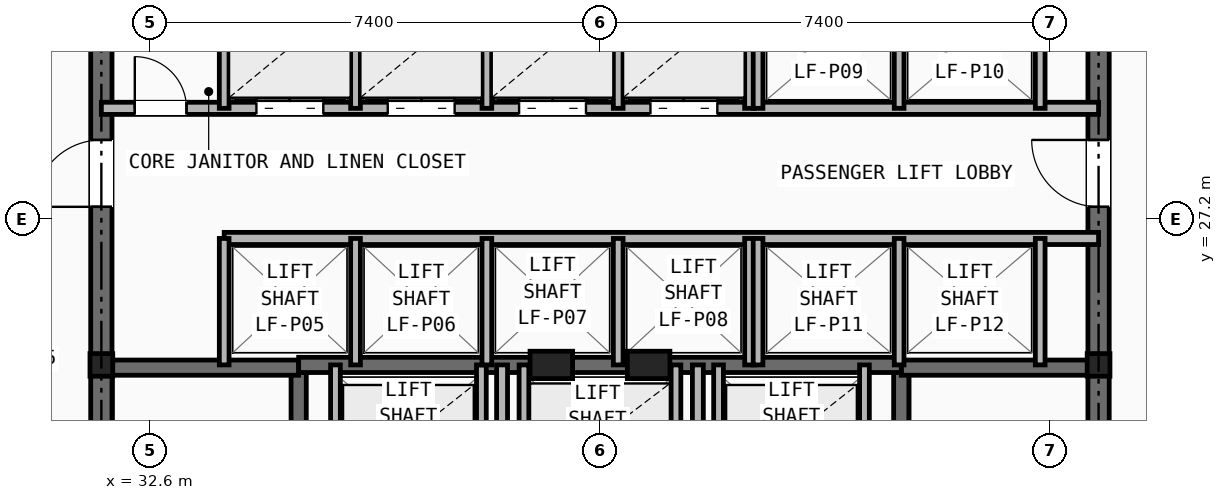
"""IFC4 building model, lengths in metres.
Left out: names, types, materials, properties, quantities, classifications, styles, units other than length and angle.
Written with IfcOpenShell. Run it as: python <this file> out.ifc"""

import sys

from ifc_helpers import new_model, si_unit, direction, frame, frame_2d, origin, origin_2d, place, context, subcontext, project, spatial, rectangle, i_section, extrude, element, fill, save


model = new_model("IFC4")
c1 = context("Model", 3, precision=1e-05, world=origin(), true_north=direction((0.0, 1.0)))
c2 = subcontext(c1, "Body", "Model", "MODEL_VIEW")
j1 = project(units=[si_unit("LENGTHUNIT", "METRE"), si_unit("PLANEANGLEUNIT", "RADIAN")], contexts=[c1])
p1 = place(None, origin())
s1 = spatial("IfcSite", under=j1, at=p1, CompositionType="ELEMENT")
p2 = place(p1, origin())
s2 = spatial("IfcBuilding", under=s1, at=p2, CompositionType="ELEMENT")
p3 = place(p2, frame((0.0, 0.0, 102.2)))
s3 = spatial("IfcBuildingStorey", under=s2, at=p3, CompositionType="ELEMENT", Elevation=102.2)
for number, where, z_axis, x_axis in (
    (1, (31.8, 24.8, 0.0), (0.0, 0.0, 1.0), (1.0, 0.0, 0.0)),
    (2, (48.2, 24.8, 0.0), (0.0, 0.0, 1.0), (1.0, 0.0, 0.0)),
):
    element("IfcColumn", number, at=place(p3, frame(where, z_axis=z_axis, x_axis=x_axis)), inside=s3, PredefinedType="COLUMN", context=c2, shape_type="SweptSolid", body=[
        extrude(i_section(OverallWidth=0.374, OverallDepth=0.372, WebThickness=0.016, FlangeThickness=0.026, at=origin_2d()), origin(), (0.0, 0.0, 1.0), 3.2),
    ])
for number, where, z_axis, x_axis in (
    (3, (39.2, 24.8, 0.0), (0.0, 0.0, 1.0), (1.0, 0.0, 0.0)),
    (4, (40.8, 24.8, 0.0), (0.0, 0.0, 1.0), (1.0, 0.0, 0.0)),
):
    element("IfcColumn", number, at=place(p3, frame(where, z_axis=z_axis, x_axis=x_axis)), inside=s3, PredefinedType="PILASTER", context=c2, shape_type="SweptSolid", body=[
        extrude(rectangle(XDim=0.7, YDim=0.45, at=origin_2d()), origin(), (0.0, 0.0, 1.0), 3.2),
    ])
p4 = place(p3, frame((31.8, 16.4, 0.0), z_axis=(0.0, 0.0, 1.0), x_axis=(0.0, 1.0, 0.0)))
e5 = element("IfcWall", 5, at=p4, inside=s3, PredefinedType="SHEAR", context=c2, shape_type="SweptSolid", body=[
    extrude(rectangle(XDim=14.8, YDim=0.35, at=frame_2d((7.4, 0.0))), origin(), (0.0, 0.0, 1.0), 2.97),
])
p5 = place(p4, frame((11.0, 0.0, 0.0)))
e6 = element("IfcOpeningElement", 6, at=p5, cuts=e5, PredefinedType="OPENING", context=c2, shape_type="SweptSolid", body=[
    extrude(rectangle(XDim=1.1, YDim=2.15, at=frame_2d((0.55, 1.075))), frame((0.0, 0.185, 0.0), z_axis=(0.0, -1.0, 0.0), x_axis=(1.0, 0.0, 0.0)), (0.0, 0.0, 1.0), 0.37),
])
p6 = place(p3, frame((48.2, 16.4, 0.0), z_axis=(0.0, 0.0, 1.0), x_axis=(0.0, 1.0, 0.0)))
e7 = element("IfcWall", 7, at=p6, inside=s3, PredefinedType="SHEAR", context=c2, shape_type="SweptSolid", body=[
    extrude(rectangle(XDim=14.8, YDim=0.35, at=frame_2d((7.4, 0.0))), origin(), (0.0, 0.0, 1.0), 2.97),
])
p7 = place(p6, frame((11.0, 0.0, 0.0)))
e8 = element("IfcOpeningElement", 8, at=p7, cuts=e7, PredefinedType="OPENING", context=c2, shape_type="SweptSolid", body=[
    extrude(rectangle(XDim=1.1, YDim=2.15, at=frame_2d((0.55, 1.075))), frame((0.0, 0.185, 0.0), z_axis=(0.0, -1.0, 0.0), x_axis=(1.0, 0.0, 0.0)), (0.0, 0.0, 1.0), 0.37),
])
p8 = place(p3, frame((35.045, 16.4, 0.0), z_axis=(0.0, 0.0, 1.0), x_axis=(0.0, 1.0, 0.0)))
e9 = element("IfcWall", 9, at=p8, inside=s3, PredefinedType="SHEAR", context=c2, shape_type="SweptSolid", body=[
    extrude(rectangle(XDim=8.4, YDim=0.25, at=frame_2d((4.2, 0.0))), origin(), (0.0, 0.0, 1.0), 2.97),
])
p9 = place(p8, frame((0.45, 0.0, 0.0)))
e10 = element("IfcOpeningElement", 10, at=p9, cuts=e9, PredefinedType="OPENING", context=c2, shape_type="SweptSolid", body=[
    extrude(rectangle(XDim=0.95, YDim=2.1, at=frame_2d((0.475, 1.05))), frame((0.0, 0.135, 0.0), z_axis=(0.0, -1.0, 0.0), x_axis=(1.0, 0.0, 0.0)), (0.0, 0.0, 1.0), 0.27),
])
p10 = place(p3, frame((31.8, 24.755, 0.0), z_axis=(0.0, 0.0, 1.0), x_axis=(1.0, 0.0, 0.0)))
e11 = element("IfcWall", 11, at=p10, inside=s3, PredefinedType="SHEAR", context=c2, shape_type="SweptSolid", body=[
    extrude(rectangle(XDim=3.245, YDim=0.25, at=frame_2d((1.623, 0.0))), origin(), (0.0, 0.0, 1.0), 2.97),
])
p11 = place(p3, frame((44.955, 16.4, 0.0), z_axis=(0.0, 0.0, 1.0), x_axis=(0.0, 1.0, 0.0)))
e12 = element("IfcWall", 12, at=p11, inside=s3, PredefinedType="SHEAR", context=c2, shape_type="SweptSolid", body=[
    extrude(rectangle(XDim=8.4, YDim=0.25, at=frame_2d((4.2, 0.0))), origin(), (0.0, 0.0, 1.0), 2.97),
])
p12 = place(p11, frame((0.45, 0.0, 0.0)))
e13 = element("IfcOpeningElement", 13, at=p12, cuts=e12, PredefinedType="OPENING", context=c2, shape_type="SweptSolid", body=[
    extrude(rectangle(XDim=0.95, YDim=2.1, at=frame_2d((0.475, 1.05))), frame((0.0, 0.135, 0.0), z_axis=(0.0, -1.0, 0.0), x_axis=(1.0, 0.0, 0.0)), (0.0, 0.0, 1.0), 0.27),
])
p13 = place(p3, frame((44.955, 24.755, 0.0), z_axis=(0.0, 0.0, 1.0), x_axis=(1.0, 0.0, 0.0)))
e14 = element("IfcWall", 14, at=p13, inside=s3, PredefinedType="SHEAR", context=c2, shape_type="SweptSolid", body=[
    extrude(rectangle(XDim=3.245, YDim=0.25, at=frame_2d((1.623, 0.0))), origin(), (0.0, 0.0, 1.0), 2.97),
])
p14 = place(p3, frame((35.045, 24.8, 0.0), z_axis=(0.0, 0.0, 1.0), x_axis=(1.0, 0.0, 0.0)))
e15 = element("IfcWall", 15, at=p14, inside=s3, PredefinedType="SHEAR", context=c2, shape_type="SweptSolid", body=[
    extrude(rectangle(XDim=9.91, YDim=0.25, at=frame_2d((4.955, 0.0))), origin(), (0.0, 0.0, 1.0), 2.97),
])
p15 = place(p3, frame((38.39, 16.4, 0.0), z_axis=(0.0, 0.0, 1.0), x_axis=(0.0, 1.0, 0.0)))
e16 = element("IfcWall", 16, at=p15, inside=s3, PredefinedType="PARTITIONING", context=c2, shape_type="SweptSolid", body=[
    extrude(rectangle(XDim=8.4, YDim=0.18, at=frame_2d((4.2, 0.0))), origin(), (0.0, 0.0, 1.0), 2.421),
])
p16 = place(p15, frame((3.8, 0.0, 0.0)))
e17 = element("IfcOpeningElement", 17, at=p16, cuts=e16, PredefinedType="OPENING", context=c2, shape_type="SweptSolid", body=[
    extrude(rectangle(XDim=0.95, YDim=2.1, at=frame_2d((0.475, 1.05))), frame((0.0, 0.1, 0.0), z_axis=(0.0, -1.0, 0.0), x_axis=(1.0, 0.0, 0.0)), (0.0, 0.0, 1.0), 0.2),
])
p17 = place(p3, frame((41.61, 16.4, 0.0), z_axis=(0.0, 0.0, 1.0), x_axis=(0.0, 1.0, 0.0)))
e18 = element("IfcWall", 18, at=p17, inside=s3, PredefinedType="PARTITIONING", context=c2, shape_type="SweptSolid", body=[
    extrude(rectangle(XDim=8.4, YDim=0.18, at=frame_2d((4.2, 0.0))), origin(), (0.0, 0.0, 1.0), 2.421),
])
for number, where, z_axis, x_axis in (
    (19, (35.65, 22.48, 0.0), (0.0, 0.0, 1.0), (0.0, 1.0, 0.0)),
    (20, (38.05, 22.48, 0.0), (0.0, 0.0, 1.0), (0.0, 1.0, 0.0)),
    (21, (41.95, 22.48, 0.0), (0.0, 0.0, 1.0), (0.0, 1.0, 0.0)),
    (22, (44.35, 22.48, 0.0), (0.0, 0.0, 1.0), (0.0, 1.0, 0.0)),
    (23, (38.75, 22.48, 0.0), (0.0, 0.0, 1.0), (0.0, 1.0, 0.0)),
    (24, (41.25, 22.48, 0.0), (0.0, 0.0, 1.0), (0.0, 1.0, 0.0)),
):
    element("IfcWall", number, at=place(p3, frame(where, z_axis=z_axis, x_axis=x_axis)), inside=s3, PredefinedType="SOLIDWALL", context=c2, shape_type="SweptSolid", body=[
        extrude(rectangle(XDim=2.32, YDim=0.16, at=frame_2d((1.16, 0.0))), origin(), (0.0, 0.0, 1.0), 2.97),
    ])
p18 = place(p3, frame((31.8, 29.02, 0.0), z_axis=(0.0, 0.0, 1.0), x_axis=(1.0, 0.0, 0.0)))
e25 = element("IfcWall", 25, at=p18, inside=s3, PredefinedType="SOLIDWALL", context=c2, shape_type="SweptSolid", body=[
    extrude(rectangle(XDim=16.4, YDim=0.2, at=frame_2d((8.2, 0.0))), origin(), (0.0, 0.0, 1.0), 2.421),
])
p19 = place(p18, frame((0.55, 0.0, 0.0)))
e26 = element("IfcOpeningElement", 26, at=p19, cuts=e25, PredefinedType="OPENING", context=c2, shape_type="SweptSolid", body=[
    extrude(rectangle(XDim=0.85, YDim=2.05, at=frame_2d((0.425, 1.025))), frame((0.0, 0.11, 0.0), z_axis=(0.0, -1.0, 0.0), x_axis=(1.0, 0.0, 0.0)), (0.0, 0.0, 1.0), 0.22),
])
p20 = place(p18, frame((2.55, 0.0, 0.0)))
e27 = element("IfcOpeningElement", 27, at=p20, cuts=e25, PredefinedType="OPENING", context=c2, shape_type="SweptSolid", body=[
    extrude(rectangle(XDim=1.1, YDim=2.15, at=frame_2d((0.55, 1.075))), frame((0.0, 0.11, 0.0), z_axis=(0.0, -1.0, 0.0), x_axis=(1.0, 0.0, 0.0)), (0.0, 0.0, 1.0), 0.22),
])
p21 = place(p18, frame((4.71, 0.0, 0.0)))
e28 = element("IfcOpeningElement", 28, at=p21, cuts=e25, PredefinedType="OPENING", context=c2, shape_type="SweptSolid", body=[
    extrude(rectangle(XDim=1.1, YDim=2.15, at=frame_2d((0.55, 1.075))), frame((0.0, 0.11, 0.0), z_axis=(0.0, -1.0, 0.0), x_axis=(1.0, 0.0, 0.0)), (0.0, 0.0, 1.0), 0.22),
])
p22 = place(p18, frame((6.87, 0.0, 0.0)))
e29 = element("IfcOpeningElement", 29, at=p22, cuts=e25, PredefinedType="OPENING", context=c2, shape_type="SweptSolid", body=[
    extrude(rectangle(XDim=1.1, YDim=2.15, at=frame_2d((0.55, 1.075))), frame((0.0, 0.11, 0.0), z_axis=(0.0, -1.0, 0.0), x_axis=(1.0, 0.0, 0.0)), (0.0, 0.0, 1.0), 0.22),
])
p23 = place(p18, frame((9.03, 0.0, 0.0)))
e30 = element("IfcOpeningElement", 30, at=p23, cuts=e25, PredefinedType="OPENING", context=c2, shape_type="SweptSolid", body=[
    extrude(rectangle(XDim=1.1, YDim=2.15, at=frame_2d((0.55, 1.075))), frame((0.0, 0.11, 0.0), z_axis=(0.0, -1.0, 0.0), x_axis=(1.0, 0.0, 0.0)), (0.0, 0.0, 1.0), 0.22),
])
p24 = place(p3, frame((33.82, 26.88, 0.0), z_axis=(0.0, 0.0, 1.0), x_axis=(1.0, 0.0, 0.0)))
e31 = element("IfcWall", 31, at=p24, inside=s3, PredefinedType="SOLIDWALL", context=c2, shape_type="SweptSolid", body=[
    extrude(rectangle(XDim=14.38, YDim=0.2, at=frame_2d((7.19, 0.0))), origin(), (0.0, 0.0, 1.0), 2.421),
])
p25 = place(p3, frame((33.82, 29.02, 0.0), z_axis=(0.0, 0.0, 1.0), x_axis=(0.0, 1.0, 0.0)))
e32 = element("IfcWall", 32, at=p25, inside=s3, PredefinedType="SOLIDWALL", context=c2, shape_type="SweptSolid", body=[
    extrude(rectangle(XDim=2.18, YDim=0.16, at=frame_2d((1.09, 0.0))), origin(), (0.0, 0.0, 1.0), 2.421),
])
p26 = place(p3, frame((33.82, 24.8, 0.0), z_axis=(0.0, 0.0, 1.0), x_axis=(0.0, 1.0, 0.0)))
e33 = element("IfcWall", 33, at=p26, inside=s3, PredefinedType="SOLIDWALL", context=c2, shape_type="SweptSolid", body=[
    extrude(rectangle(XDim=2.08, YDim=0.16, at=frame_2d((1.04, 0.0))), origin(), (0.0, 0.0, 1.0), 2.97),
])
for number, where, z_axis, x_axis in (
    (34, (35.98, 29.02, 0.0), (0.0, 0.0, 1.0), (0.0, 1.0, 0.0)),
    (35, (38.14, 29.02, 0.0), (0.0, 0.0, 1.0), (0.0, 1.0, 0.0)),
    (36, (40.3, 29.02, 0.0), (0.0, 0.0, 1.0), (0.0, 1.0, 0.0)),
    (37, (42.46, 29.02, 0.0), (0.0, 0.0, 1.0), (0.0, 1.0, 0.0)),
):
    element("IfcWall", number, at=place(p3, frame(where, z_axis=z_axis, x_axis=x_axis)), inside=s3, PredefinedType="SOLIDWALL", context=c2, shape_type="SweptSolid", body=[
        extrude(rectangle(XDim=2.18, YDim=0.16, at=frame_2d((1.09, 0.0))), origin(), (0.0, 0.0, 1.0), 2.421),
    ])
for number, where, z_axis, x_axis in (
    (38, (35.98, 24.8, 0.0), (0.0, 0.0, 1.0), (0.0, 1.0, 0.0)),
    (39, (38.14, 24.8, 0.0), (0.0, 0.0, 1.0), (0.0, 1.0, 0.0)),
    (40, (40.3, 24.8, 0.0), (0.0, 0.0, 1.0), (0.0, 1.0, 0.0)),
    (41, (42.46, 24.8, 0.0), (0.0, 0.0, 1.0), (0.0, 1.0, 0.0)),
):
    element("IfcWall", number, at=place(p3, frame(where, z_axis=z_axis, x_axis=x_axis)), inside=s3, PredefinedType="SOLIDWALL", context=c2, shape_type="SweptSolid", body=[
        extrude(rectangle(XDim=2.08, YDim=0.16, at=frame_2d((1.04, 0.0))), origin(), (0.0, 0.0, 1.0), 2.97),
    ])
for number, where, z_axis, x_axis in (
    (42, (42.6, 29.02, 0.0), (0.0, 0.0, 1.0), (0.0, 1.0, 0.0)),
    (43, (44.92, 29.02, 0.0), (0.0, 0.0, 1.0), (0.0, 1.0, 0.0)),
    (44, (47.24, 29.02, 0.0), (0.0, 0.0, 1.0), (0.0, 1.0, 0.0)),
):
    element("IfcWall", number, at=place(p3, frame(where, z_axis=z_axis, x_axis=x_axis)), inside=s3, PredefinedType="SOLIDWALL", context=c2, shape_type="SweptSolid", body=[
        extrude(rectangle(XDim=2.18, YDim=0.16, at=frame_2d((1.09, 0.0))), origin(), (0.0, 0.0, 1.0), 2.421),
    ])
for number, where, z_axis, x_axis in (
    (45, (42.6, 24.8, 0.0), (0.0, 0.0, 1.0), (0.0, 1.0, 0.0)),
    (46, (44.92, 24.8, 0.0), (0.0, 0.0, 1.0), (0.0, 1.0, 0.0)),
    (47, (47.24, 24.8, 0.0), (0.0, 0.0, 1.0), (0.0, 1.0, 0.0)),
):
    element("IfcWall", number, at=place(p3, frame(where, z_axis=z_axis, x_axis=x_axis)), inside=s3, PredefinedType="SOLIDWALL", context=c2, shape_type="SweptSolid", body=[
        extrude(rectangle(XDim=2.08, YDim=0.16, at=frame_2d((1.04, 0.0))), origin(), (0.0, 0.0, 1.0), 2.97),
    ])
p27 = place(p19, origin())
e48 = element("IfcDoor", 48, at=p27, inside=s3, OperationType="SINGLE_SWING_LEFT", PredefinedType="DOOR", context=c2, shape_type="SweptSolid", body=[
    extrude(rectangle(XDim=0.85, YDim=2.05, at=frame_2d((0.425, 1.025))), frame((0.0, 0.025, 0.0), z_axis=(0.0, -1.0, 0.0), x_axis=(1.0, 0.0, 0.0)), (0.0, 0.0, 1.0), 0.05),
])
fill(e26, e48)
p28 = place(p5, origin())
e49 = element("IfcDoor", 49, at=p28, inside=s3, OperationType="SINGLE_SWING_LEFT", PredefinedType="DOOR", context=c2, shape_type="SweptSolid", body=[
    extrude(rectangle(XDim=1.1, YDim=2.15, at=frame_2d((0.55, 1.075))), frame((0.0, 0.025, 0.0), z_axis=(0.0, -1.0, 0.0), x_axis=(1.0, 0.0, 0.0)), (0.0, 0.0, 1.0), 0.05),
])
fill(e6, e49)
p29 = place(p7, origin())
e50 = element("IfcDoor", 50, at=p29, inside=s3, OperationType="SINGLE_SWING_RIGHT", PredefinedType="DOOR", context=c2, shape_type="SweptSolid", body=[
    extrude(rectangle(XDim=1.1, YDim=2.15, at=frame_2d((0.55, 1.075))), frame((0.0, 0.025, 0.0), z_axis=(0.0, -1.0, 0.0), x_axis=(1.0, 0.0, 0.0)), (0.0, 0.0, 1.0), 0.05),
])
fill(e8, e50)
p30 = place(p20, origin())
e51 = element("IfcDoor", 51, at=p30, inside=s3, OperationType="DOUBLE_DOOR_SLIDING", PredefinedType="DOOR", context=c2, shape_type="SweptSolid", body=[
    extrude(rectangle(XDim=1.1, YDim=2.15, at=frame_2d((0.55, 1.075))), frame((0.0, 0.025, 0.0), z_axis=(0.0, -1.0, 0.0), x_axis=(1.0, 0.0, 0.0)), (0.0, 0.0, 1.0), 0.05),
])
fill(e27, e51)
p31 = place(p21, origin())
e52 = element("IfcDoor", 52, at=p31, inside=s3, OperationType="DOUBLE_DOOR_SLIDING", PredefinedType="DOOR", context=c2, shape_type="SweptSolid", body=[
    extrude(rectangle(XDim=1.1, YDim=2.15, at=frame_2d((0.55, 1.075))), frame((0.0, 0.025, 0.0), z_axis=(0.0, -1.0, 0.0), x_axis=(1.0, 0.0, 0.0)), (0.0, 0.0, 1.0), 0.05),
])
fill(e28, e52)
p32 = place(p22, origin())
e53 = element("IfcDoor", 53, at=p32, inside=s3, OperationType="DOUBLE_DOOR_SLIDING", PredefinedType="DOOR", context=c2, shape_type="SweptSolid", body=[
    extrude(rectangle(XDim=1.1, YDim=2.15, at=frame_2d((0.55, 1.075))), frame((0.0, 0.025, 0.0), z_axis=(0.0, -1.0, 0.0), x_axis=(1.0, 0.0, 0.0)), (0.0, 0.0, 1.0), 0.05),
])
fill(e29, e53)
p33 = place(p23, origin())
e54 = element("IfcDoor", 54, at=p33, inside=s3, OperationType="DOUBLE_DOOR_SLIDING", PredefinedType="DOOR", context=c2, shape_type="SweptSolid", body=[
    extrude(rectangle(XDim=1.1, YDim=2.15, at=frame_2d((0.55, 1.075))), frame((0.0, 0.025, 0.0), z_axis=(0.0, -1.0, 0.0), x_axis=(1.0, 0.0, 0.0)), (0.0, 0.0, 1.0), 0.05),
])
fill(e30, e54)
save(model, sys.argv[1])
